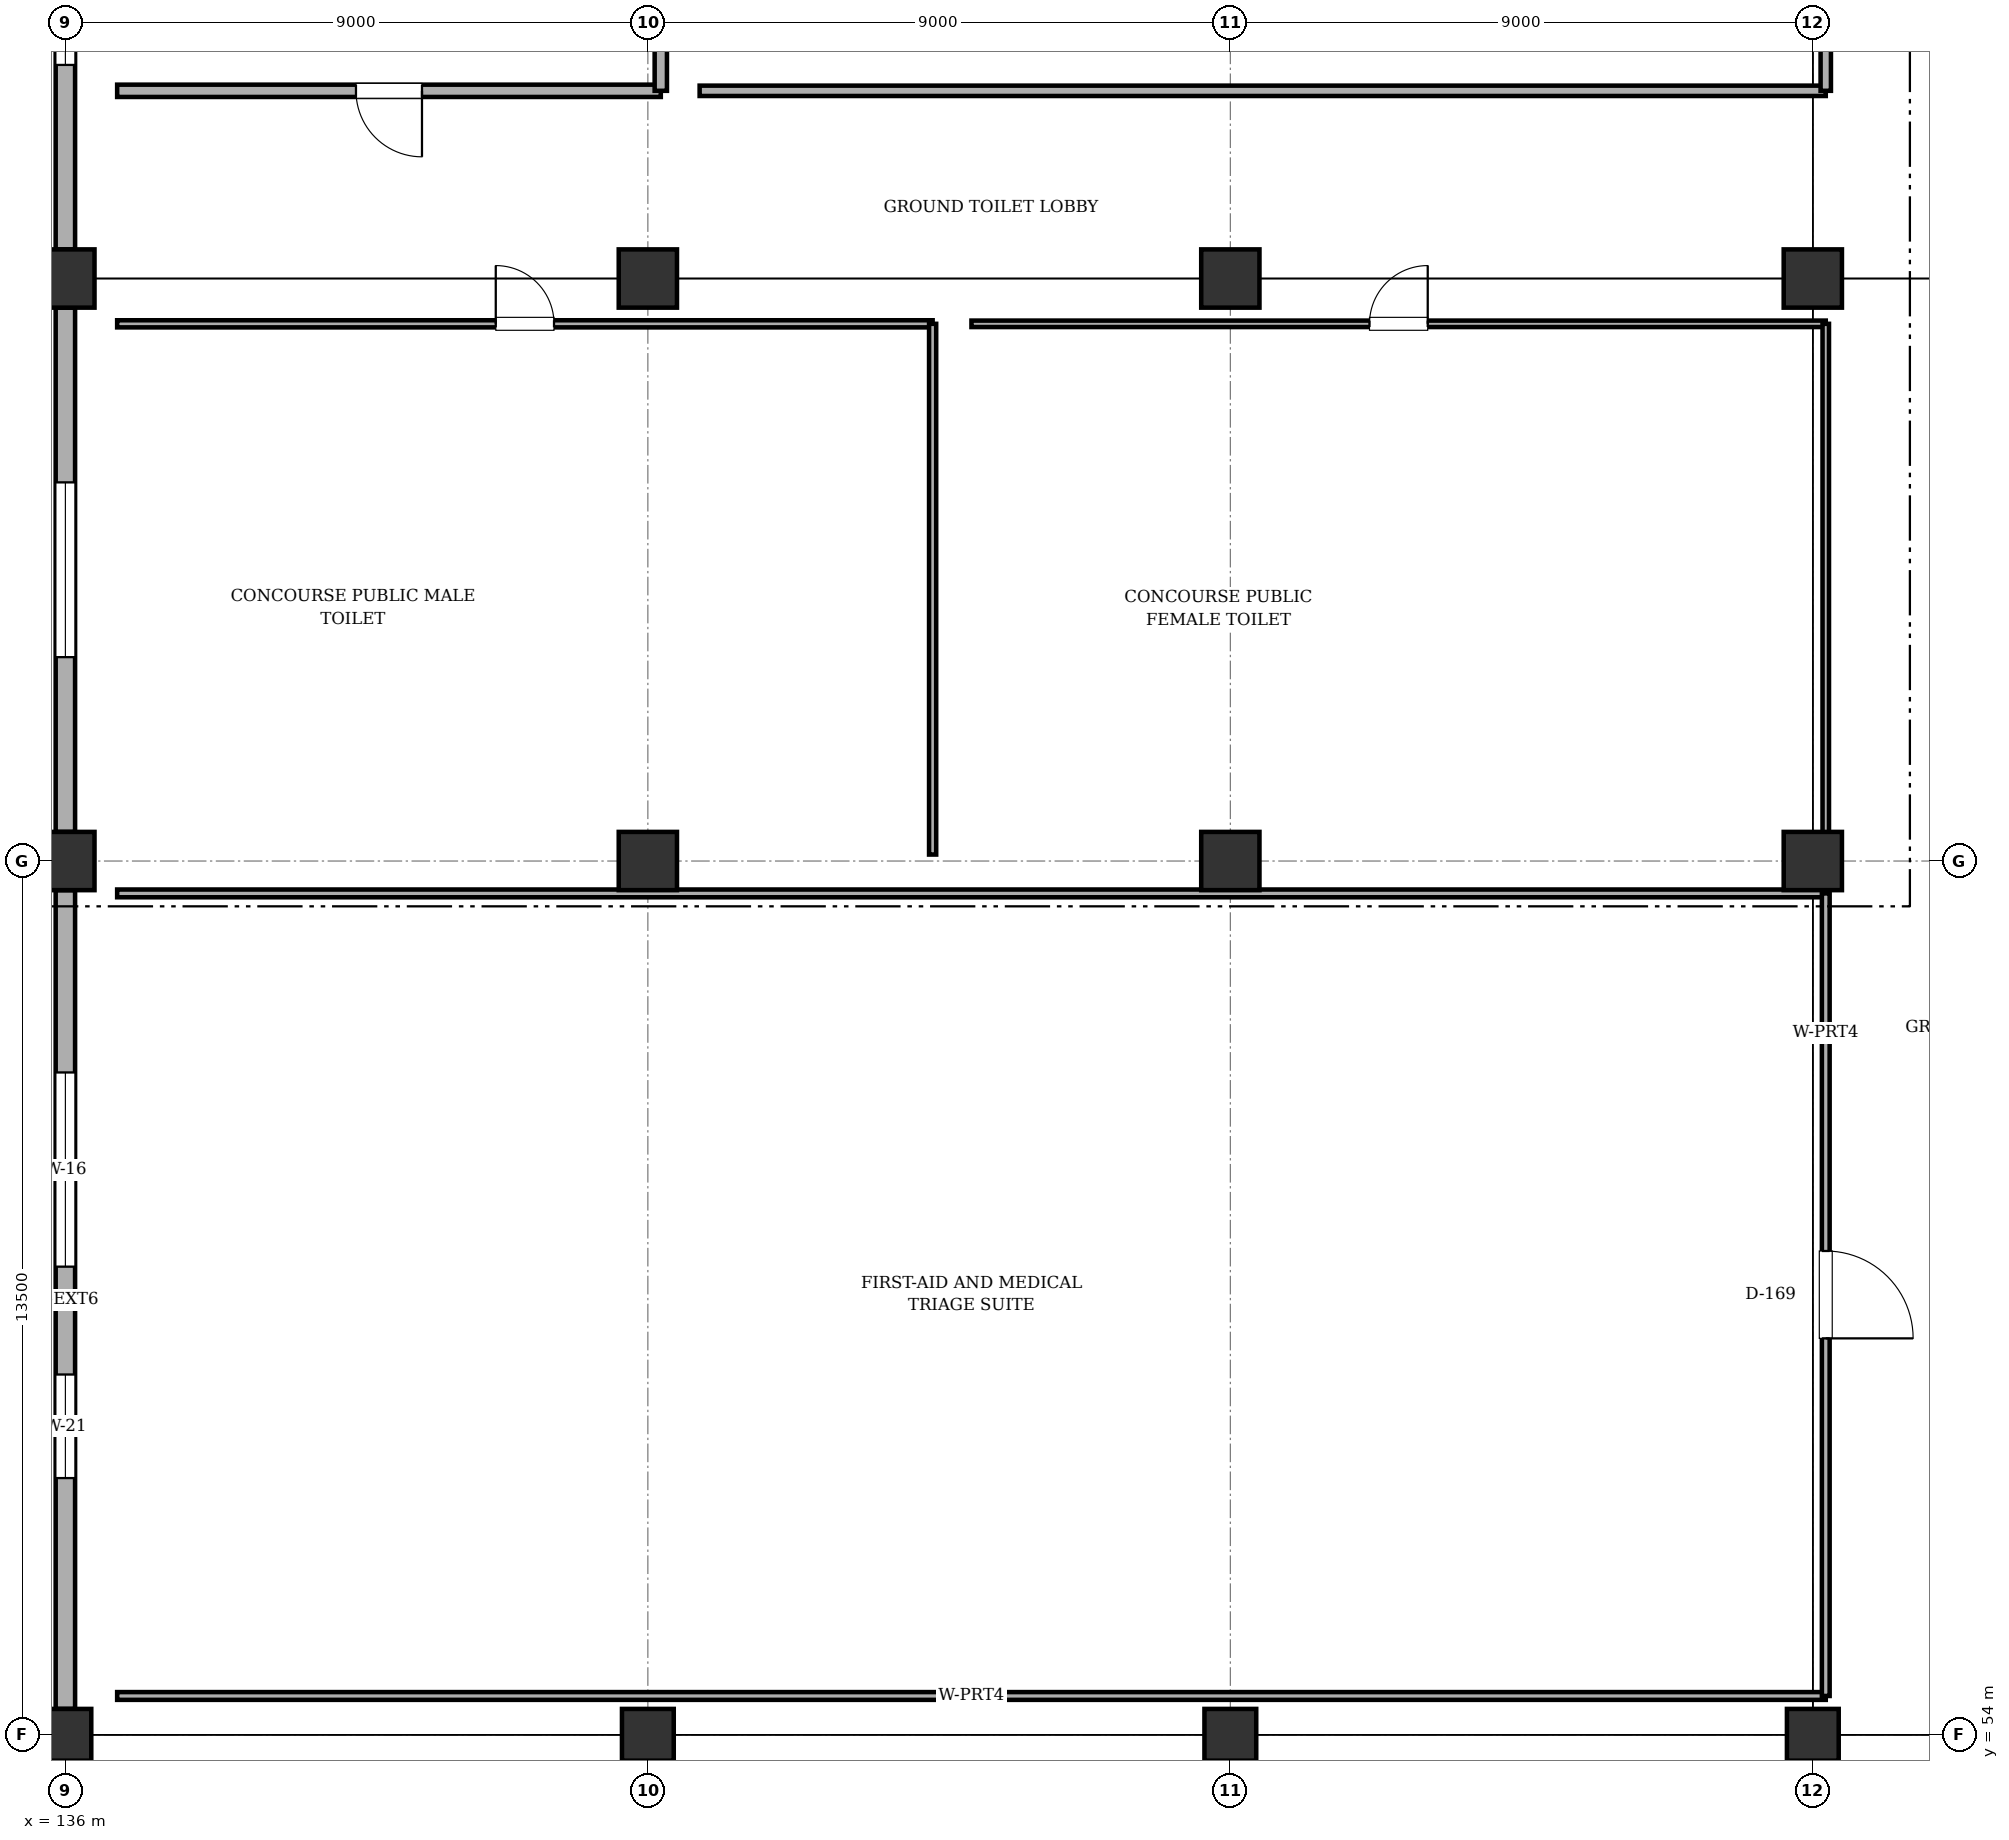
"""IFC4 building model, lengths in metres.
Left out: names, types, materials, properties, quantities, classifications, styles, units other than length and angle.
Written with IfcOpenShell. Run it as: python <this file> out.ifc"""

import sys

from ifc_helpers import new_model, si_unit, direction, frame, frame_2d, origin, origin_2d, place, context, subcontext, project, spatial, rectangle, extrude, element, fill, save


model = new_model("IFC4")
c1 = context("Model", 3, precision=1e-05, world=origin(), true_north=direction((0.0, 1.0)))
c2 = subcontext(c1, "Body", "Model", "MODEL_VIEW")
j1 = project(units=[si_unit("LENGTHUNIT", "METRE"), si_unit("PLANEANGLEUNIT", "RADIAN")], contexts=[c1])
p1 = place(None, origin())
s1 = spatial("IfcSite", under=j1, at=p1, CompositionType="ELEMENT")
p2 = place(p1, origin())
s2 = spatial("IfcBuilding", under=s1, at=p2, CompositionType="ELEMENT")
p3 = place(p2, origin())
s3 = spatial("IfcBuildingStorey", under=s2, at=p3, CompositionType="ELEMENT", Elevation=0.0)
p4 = place(p3, frame((136.0, 54.0, 0.0), z_axis=(0.0, 0.0, 1.0), x_axis=(1.0, 0.0, 0.0)))
e1 = element("IfcColumn", 1, at=p4, inside=s3, PredefinedType="COLUMN", context=c2, shape_type="SweptSolid", body=[
    extrude(rectangle(XDim=0.8, YDim=0.8, at=origin_2d()), origin(), (0.0, 0.0, 1.0), 6.6),
])
for number, where, z_axis, x_axis in (
    (2, (136.0, 67.5, 0.0), (0.0, 0.0, 1.0), (1.0, 0.0, 0.0)),
    (3, (136.0, 76.5, 0.0), (0.0, 0.0, 1.0), (1.0, 0.0, 0.0)),
):
    element("IfcColumn", number, at=place(p3, frame(where, z_axis=z_axis, x_axis=x_axis)), inside=s3, PredefinedType="COLUMN", context=c2, shape_type="SweptSolid", body=[
        extrude(rectangle(XDim=0.9, YDim=0.9, at=origin_2d()), origin(), (0.0, 0.0, 1.0), 6.6),
    ])
p5 = place(p3, frame((145.0, 54.0, 0.0), z_axis=(0.0, 0.0, 1.0), x_axis=(1.0, 0.0, 0.0)))
e4 = element("IfcColumn", 4, at=p5, inside=s3, PredefinedType="COLUMN", context=c2, shape_type="SweptSolid", body=[
    extrude(rectangle(XDim=0.8, YDim=0.8, at=origin_2d()), origin(), (0.0, 0.0, 1.0), 6.6),
])
for number, where, z_axis, x_axis in (
    (5, (145.0, 67.5, 0.0), (0.0, 0.0, 1.0), (1.0, 0.0, 0.0)),
    (6, (145.0, 76.5, 0.0), (0.0, 0.0, 1.0), (1.0, 0.0, 0.0)),
):
    element("IfcColumn", number, at=place(p3, frame(where, z_axis=z_axis, x_axis=x_axis)), inside=s3, PredefinedType="COLUMN", context=c2, shape_type="SweptSolid", body=[
        extrude(rectangle(XDim=0.9, YDim=0.9, at=origin_2d()), origin(), (0.0, 0.0, 1.0), 6.6),
    ])
p6 = place(p3, frame((154.0, 54.0, 0.0), z_axis=(0.0, 0.0, 1.0), x_axis=(1.0, 0.0, 0.0)))
e7 = element("IfcColumn", 7, at=p6, inside=s3, PredefinedType="COLUMN", context=c2, shape_type="SweptSolid", body=[
    extrude(rectangle(XDim=0.8, YDim=0.8, at=origin_2d()), origin(), (0.0, 0.0, 1.0), 6.6),
])
for number, where, z_axis, x_axis in (
    (8, (154.0, 67.5, 0.0), (0.0, 0.0, 1.0), (1.0, 0.0, 0.0)),
    (9, (154.0, 76.5, 0.0), (0.0, 0.0, 1.0), (1.0, 0.0, 0.0)),
):
    element("IfcColumn", number, at=place(p3, frame(where, z_axis=z_axis, x_axis=x_axis)), inside=s3, PredefinedType="COLUMN", context=c2, shape_type="SweptSolid", body=[
        extrude(rectangle(XDim=0.9, YDim=0.9, at=origin_2d()), origin(), (0.0, 0.0, 1.0), 6.6),
    ])
p7 = place(p3, frame((163.0, 54.0, 0.0), z_axis=(0.0, 0.0, 1.0), x_axis=(1.0, 0.0, 0.0)))
e10 = element("IfcColumn", 10, at=p7, inside=s3, PredefinedType="COLUMN", context=c2, shape_type="SweptSolid", body=[
    extrude(rectangle(XDim=0.8, YDim=0.8, at=origin_2d()), origin(), (0.0, 0.0, 1.0), 6.6),
])
for number, where, z_axis, x_axis in (
    (11, (163.0, 67.5, 0.0), (0.0, 0.0, 1.0), (1.0, 0.0, 0.0)),
    (12, (163.0, 76.5, 0.0), (0.0, 0.0, 1.0), (1.0, 0.0, 0.0)),
):
    element("IfcColumn", number, at=place(p3, frame(where, z_axis=z_axis, x_axis=x_axis)), inside=s3, PredefinedType="COLUMN", context=c2, shape_type="SweptSolid", body=[
        extrude(rectangle(XDim=0.9, YDim=0.9, at=origin_2d()), origin(), (0.0, 0.0, 1.0), 6.6),
    ])
p8 = place(p3, frame((136.0, 54.4, 0.0), z_axis=(0.0, 0.0, 1.0), x_axis=(0.0, 1.0, 0.0)))
e13 = element("IfcWall", 13, at=p8, inside=s3, PredefinedType="SOLIDWALL", context=c2, shape_type="SweptSolid", body=[
    extrude(rectangle(XDim=12.65, YDim=0.3, at=frame_2d((6.325, 0.0))), origin(), (0.0, 0.0, 1.0), 5.77),
])
p9 = place(p8, frame((3.567, 0.0, 0.95)))
e14 = element("IfcOpeningElement", 14, at=p9, cuts=e13, PredefinedType="OPENING", context=c2, shape_type="SweptSolid", body=[
    extrude(rectangle(XDim=1.6, YDim=1.9, at=frame_2d((0.8, 0.95))), frame((0.0, 0.16, 0.0), z_axis=(0.0, -1.0, 0.0), x_axis=(1.0, 0.0, 0.0)), (0.0, 0.0, 1.0), 0.32),
])
p10 = place(p8, frame((6.833, 0.0, 0.95)))
e15 = element("IfcOpeningElement", 15, at=p10, cuts=e13, PredefinedType="OPENING", context=c2, shape_type="SweptSolid", body=[
    extrude(rectangle(XDim=3.0, YDim=2.1, at=frame_2d((1.5, 1.05))), frame((0.0, 0.16, 0.0), z_axis=(0.0, -1.0, 0.0), x_axis=(1.0, 0.0, 0.0)), (0.0, 0.0, 1.0), 0.32),
])
p11 = place(p3, frame((136.0, 67.95, 0.0), z_axis=(0.0, 0.0, 1.0), x_axis=(0.0, 1.0, 0.0)))
e16 = element("IfcWall", 16, at=p11, inside=s3, PredefinedType="SOLIDWALL", context=c2, shape_type="SweptSolid", body=[
    extrude(rectangle(XDim=8.1, YDim=0.3, at=frame_2d((4.05, 0.0))), origin(), (0.0, 0.0, 1.0), 5.77),
])
p12 = place(p11, frame((2.7, 0.0, 0.95)))
e17 = element("IfcOpeningElement", 17, at=p12, cuts=e16, PredefinedType="OPENING", context=c2, shape_type="SweptSolid", body=[
    extrude(rectangle(XDim=2.7, YDim=2.1, at=frame_2d((1.35, 1.05))), frame((0.0, 0.16, 0.0), z_axis=(0.0, -1.0, 0.0), x_axis=(1.0, 0.0, 0.0)), (0.0, 0.0, 1.0), 0.32),
])
p13 = place(p3, frame((136.0, 76.95, 0.0), z_axis=(0.0, 0.0, 1.0), x_axis=(0.0, 1.0, 0.0)))
e18 = element("IfcWall", 18, at=p13, inside=s3, PredefinedType="SOLIDWALL", context=c2, shape_type="SweptSolid", body=[
    extrude(rectangle(XDim=8.1, YDim=0.3, at=frame_2d((4.05, 0.0))), origin(), (0.0, 0.0, 1.0), 5.93),
])
p14 = place(p13, frame((2.85, 0.0, 0.95)))
e19 = element("IfcOpeningElement", 19, at=p14, cuts=e18, PredefinedType="OPENING", context=c2, shape_type="SweptSolid", body=[
    extrude(rectangle(XDim=2.4, YDim=2.1, at=frame_2d((1.2, 1.05))), frame((0.0, 0.16, 0.0), z_axis=(0.0, -1.0, 0.0), x_axis=(1.0, 0.0, 0.0)), (0.0, 0.0, 1.0), 0.32),
])
for number, where, z_axis, x_axis in (
    (20, (163.2, 54.6, 0.0), (0.0, 0.0, 1.0), (-1.0, 0.0, 0.0)),
    (21, (136.8, 67.0, 0.0), (0.0, 0.0, 1.0), (1.0, 0.0, 0.0)),
):
    element("IfcWall", number, at=place(p3, frame(where, z_axis=z_axis, x_axis=x_axis)), inside=s3, PredefinedType="PARTITIONING", context=c2, shape_type="SweptSolid", body=[
        extrude(rectangle(XDim=26.4, YDim=0.12, at=frame_2d((13.2, 0.0))), origin(), (0.0, 0.0, 1.0), 4.4),
    ])
p15 = place(p3, frame((163.2, 67.0, 0.0), z_axis=(0.0, 0.0, 1.0), x_axis=(0.0, -1.0, 0.0)))
e22 = element("IfcWall", 22, at=p15, inside=s3, PredefinedType="PARTITIONING", context=c2, shape_type="SweptSolid", body=[
    extrude(rectangle(XDim=12.4, YDim=0.12, at=frame_2d((6.2, 0.0))), origin(), (0.0, 0.0, 1.0), 4.4),
])
p16 = place(p15, frame((5.525, 0.0, 0.0)))
e23 = element("IfcOpeningElement", 23, at=p16, cuts=e22, PredefinedType="OPENING", context=c2, shape_type="SweptSolid", body=[
    extrude(rectangle(XDim=1.35, YDim=2.1, at=frame_2d((0.675, 1.05))), frame((0.0, 0.07, 0.0), z_axis=(0.0, -1.0, 0.0), x_axis=(1.0, 0.0, 0.0)), (0.0, 0.0, 1.0), 0.14),
])
p17 = place(p3, frame((136.8, 75.8, 0.0), z_axis=(0.0, 0.0, 1.0), x_axis=(1.0, 0.0, 0.0)))
e24 = element("IfcWall", 24, at=p17, inside=s3, PredefinedType="PARTITIONING", context=c2, shape_type="SweptSolid", body=[
    extrude(rectangle(XDim=12.6, YDim=0.11, at=frame_2d((6.3, 0.0))), origin(), (0.0, 0.0, 1.0), 4.4),
])
p18 = place(p17, frame((5.85, 0.0, 0.0)))
e25 = element("IfcOpeningElement", 25, at=p18, cuts=e24, PredefinedType="OPENING", context=c2, shape_type="SweptSolid", body=[
    extrude(rectangle(XDim=0.9, YDim=2.1, at=frame_2d((0.45, 1.05))), frame((0.0, 0.065, 0.0), z_axis=(0.0, -1.0, 0.0), x_axis=(1.0, 0.0, 0.0)), (0.0, 0.0, 1.0), 0.13),
])
p19 = place(p3, frame((149.4, 75.8, 0.0), z_axis=(0.0, 0.0, 1.0), x_axis=(0.0, -1.0, 0.0)))
e26 = element("IfcWall", 26, at=p19, inside=s3, PredefinedType="PARTITIONING", context=c2, shape_type="SweptSolid", body=[
    extrude(rectangle(XDim=8.2, YDim=0.11, at=frame_2d((4.1, 0.0))), origin(), (0.0, 0.0, 1.0), 4.4),
])
p20 = place(p3, frame((150.0, 75.8, 0.0), z_axis=(0.0, 0.0, 1.0), x_axis=(1.0, 0.0, 0.0)))
e27 = element("IfcWall", 27, at=p20, inside=s3, PredefinedType="PARTITIONING", context=c2, shape_type="SweptSolid", body=[
    extrude(rectangle(XDim=13.2, YDim=0.1, at=frame_2d((6.6, 0.0))), origin(), (0.0, 0.0, 1.0), 4.4),
])
p21 = place(p20, frame((6.15, 0.0, 0.0)))
e28 = element("IfcOpeningElement", 28, at=p21, cuts=e27, PredefinedType="OPENING", context=c2, shape_type="SweptSolid", body=[
    extrude(rectangle(XDim=0.9, YDim=2.1, at=frame_2d((0.45, 1.05))), frame((0.0, 0.06, 0.0), z_axis=(0.0, -1.0, 0.0), x_axis=(1.0, 0.0, 0.0)), (0.0, 0.0, 1.0), 0.12),
])
p22 = place(p3, frame((163.2, 75.8, 0.0), z_axis=(0.0, 0.0, 1.0), x_axis=(0.0, -1.0, 0.0)))
e29 = element("IfcWall", 29, at=p22, inside=s3, PredefinedType="PARTITIONING", context=c2, shape_type="SweptSolid", body=[
    extrude(rectangle(XDim=8.2, YDim=0.1, at=frame_2d((4.1, 0.0))), origin(), (0.0, 0.0, 1.0), 4.4),
])
p23 = place(p3, frame((145.2, 79.4, 0.0), z_axis=(0.0, 0.0, 1.0), x_axis=(-1.0, 0.0, 0.0)))
e30 = element("IfcWall", 30, at=p23, inside=s3, PredefinedType="PARTITIONING", context=c2, shape_type="SweptSolid", body=[
    extrude(rectangle(XDim=8.4, YDim=0.19, at=frame_2d((4.2, 0.0))), origin(), (0.0, 0.0, 1.0), 4.4),
])
p24 = place(p23, frame((3.69, 0.0, 0.0)))
e31 = element("IfcOpeningElement", 31, at=p24, cuts=e30, PredefinedType="OPENING", context=c2, shape_type="SweptSolid", body=[
    extrude(rectangle(XDim=1.02, YDim=2.05, at=frame_2d((0.51, 1.025))), frame((0.0, 0.105, 0.0), z_axis=(0.0, -1.0, 0.0), x_axis=(1.0, 0.0, 0.0)), (0.0, 0.0, 1.0), 0.21),
])
p25 = place(p3, frame((145.2, 85.0, 0.0), z_axis=(0.0, 0.0, 1.0), x_axis=(0.0, -1.0, 0.0)))
e32 = element("IfcWall", 32, at=p25, inside=s3, PredefinedType="PARTITIONING", context=c2, shape_type="SweptSolid", body=[
    extrude(rectangle(XDim=5.6, YDim=0.19, at=frame_2d((2.8, 0.0))), origin(), (0.0, 0.0, 1.0), 4.4),
])
p26 = place(p3, frame((163.2, 79.4, 0.0), z_axis=(0.0, 0.0, 1.0), x_axis=(-1.0, 0.0, 0.0)))
e33 = element("IfcWall", 33, at=p26, inside=s3, PredefinedType="PARTITIONING", context=c2, shape_type="SweptSolid", body=[
    extrude(rectangle(XDim=17.4, YDim=0.16, at=frame_2d((8.7, 0.0))), origin(), (0.0, 0.0, 1.0), 4.4),
])
p27 = place(p3, frame((163.2, 103.0, 0.0), z_axis=(0.0, 0.0, 1.0), x_axis=(0.0, -1.0, 0.0)))
e34 = element("IfcWall", 34, at=p27, inside=s3, PredefinedType="PARTITIONING", context=c2, shape_type="SweptSolid", body=[
    extrude(rectangle(XDim=23.6, YDim=0.16, at=frame_2d((11.8, 0.0))), origin(), (0.0, 0.0, 1.0), 4.4),
])
p28 = place(p27, frame((11.225, 0.0, 0.0)))
e35 = element("IfcOpeningElement", 35, at=p28, cuts=e34, PredefinedType="OPENING", context=c2, shape_type="SweptSolid", body=[
    extrude(rectangle(XDim=1.15, YDim=2.1, at=frame_2d((0.575, 1.05))), frame((0.0, 0.09, 0.0), z_axis=(0.0, -1.0, 0.0), x_axis=(1.0, 0.0, 0.0)), (0.0, 0.0, 1.0), 0.18),
])
p29 = place(p9, origin())
e36 = element("IfcWindow", 36, at=p29, inside=s3, PartitioningType="SINGLE_PANEL", PredefinedType="WINDOW", context=c2, shape_type="SweptSolid", body=[
    extrude(rectangle(XDim=1.6, YDim=1.9, at=frame_2d((0.8, 0.95))), frame((0.0, 0.03, 0.0), z_axis=(0.0, -1.0, 0.0), x_axis=(1.0, 0.0, 0.0)), (0.0, 0.0, 1.0), 0.06),
])
fill(e14, e36)
p30 = place(p10, origin())
e37 = element("IfcWindow", 37, at=p30, inside=s3, PartitioningType="SINGLE_PANEL", PredefinedType="WINDOW", context=c2, shape_type="SweptSolid", body=[
    extrude(rectangle(XDim=3.0, YDim=2.1, at=frame_2d((1.5, 1.05))), frame((0.0, 0.03, 0.0), z_axis=(0.0, -1.0, 0.0), x_axis=(1.0, 0.0, 0.0)), (0.0, 0.0, 1.0), 0.06),
])
fill(e15, e37)
p31 = place(p12, origin())
e38 = element("IfcWindow", 38, at=p31, inside=s3, PartitioningType="SINGLE_PANEL", PredefinedType="WINDOW", context=c2, shape_type="SweptSolid", body=[
    extrude(rectangle(XDim=2.7, YDim=2.1, at=frame_2d((1.35, 1.05))), frame((0.0, 0.03, 0.0), z_axis=(0.0, -1.0, 0.0), x_axis=(1.0, 0.0, 0.0)), (0.0, 0.0, 1.0), 0.06),
])
fill(e17, e38)
p32 = place(p14, origin())
e39 = element("IfcWindow", 39, at=p32, inside=s3, PartitioningType="SINGLE_PANEL", PredefinedType="WINDOW", context=c2, shape_type="SweptSolid", body=[
    extrude(rectangle(XDim=2.4, YDim=2.1, at=frame_2d((1.2, 1.05))), frame((0.0, 0.03, 0.0), z_axis=(0.0, -1.0, 0.0), x_axis=(1.0, 0.0, 0.0)), (0.0, 0.0, 1.0), 0.06),
])
fill(e19, e39)
p33 = place(p16, origin())
e40 = element("IfcDoor", 40, at=p33, inside=s3, OperationType="SINGLE_SWING_RIGHT", PredefinedType="DOOR", context=c2, shape_type="SweptSolid", body=[
    extrude(rectangle(XDim=1.35, YDim=2.1, at=frame_2d((0.675, 1.05))), frame((0.0, 0.025, 0.0), z_axis=(0.0, -1.0, 0.0), x_axis=(1.0, 0.0, 0.0)), (0.0, 0.0, 1.0), 0.05),
])
fill(e23, e40)
p34 = place(p18, origin())
e41 = element("IfcDoor", 41, at=p34, inside=s3, OperationType="SINGLE_SWING_LEFT", PredefinedType="DOOR", context=c2, shape_type="SweptSolid", body=[
    extrude(rectangle(XDim=0.9, YDim=2.1, at=frame_2d((0.45, 1.05))), frame((0.0, 0.025, 0.0), z_axis=(0.0, -1.0, 0.0), x_axis=(1.0, 0.0, 0.0)), (0.0, 0.0, 1.0), 0.05),
])
fill(e25, e41)
p35 = place(p21, origin())
e42 = element("IfcDoor", 42, at=p35, inside=s3, OperationType="SINGLE_SWING_RIGHT", PredefinedType="DOOR", context=c2, shape_type="SweptSolid", body=[
    extrude(rectangle(XDim=0.9, YDim=2.1, at=frame_2d((0.45, 1.05))), frame((0.0, 0.025, 0.0), z_axis=(0.0, -1.0, 0.0), x_axis=(1.0, 0.0, 0.0)), (0.0, 0.0, 1.0), 0.05),
])
fill(e28, e42)
p36 = place(p24, origin())
e43 = element("IfcDoor", 43, at=p36, inside=s3, OperationType="SINGLE_SWING_LEFT", PredefinedType="DOOR", context=c2, shape_type="SweptSolid", body=[
    extrude(rectangle(XDim=1.02, YDim=2.05, at=frame_2d((0.51, 1.025))), frame((0.0, 0.025, 0.0), z_axis=(0.0, -1.0, 0.0), x_axis=(1.0, 0.0, 0.0)), (0.0, 0.0, 1.0), 0.05),
])
fill(e31, e43)
save(model, sys.argv[1])
